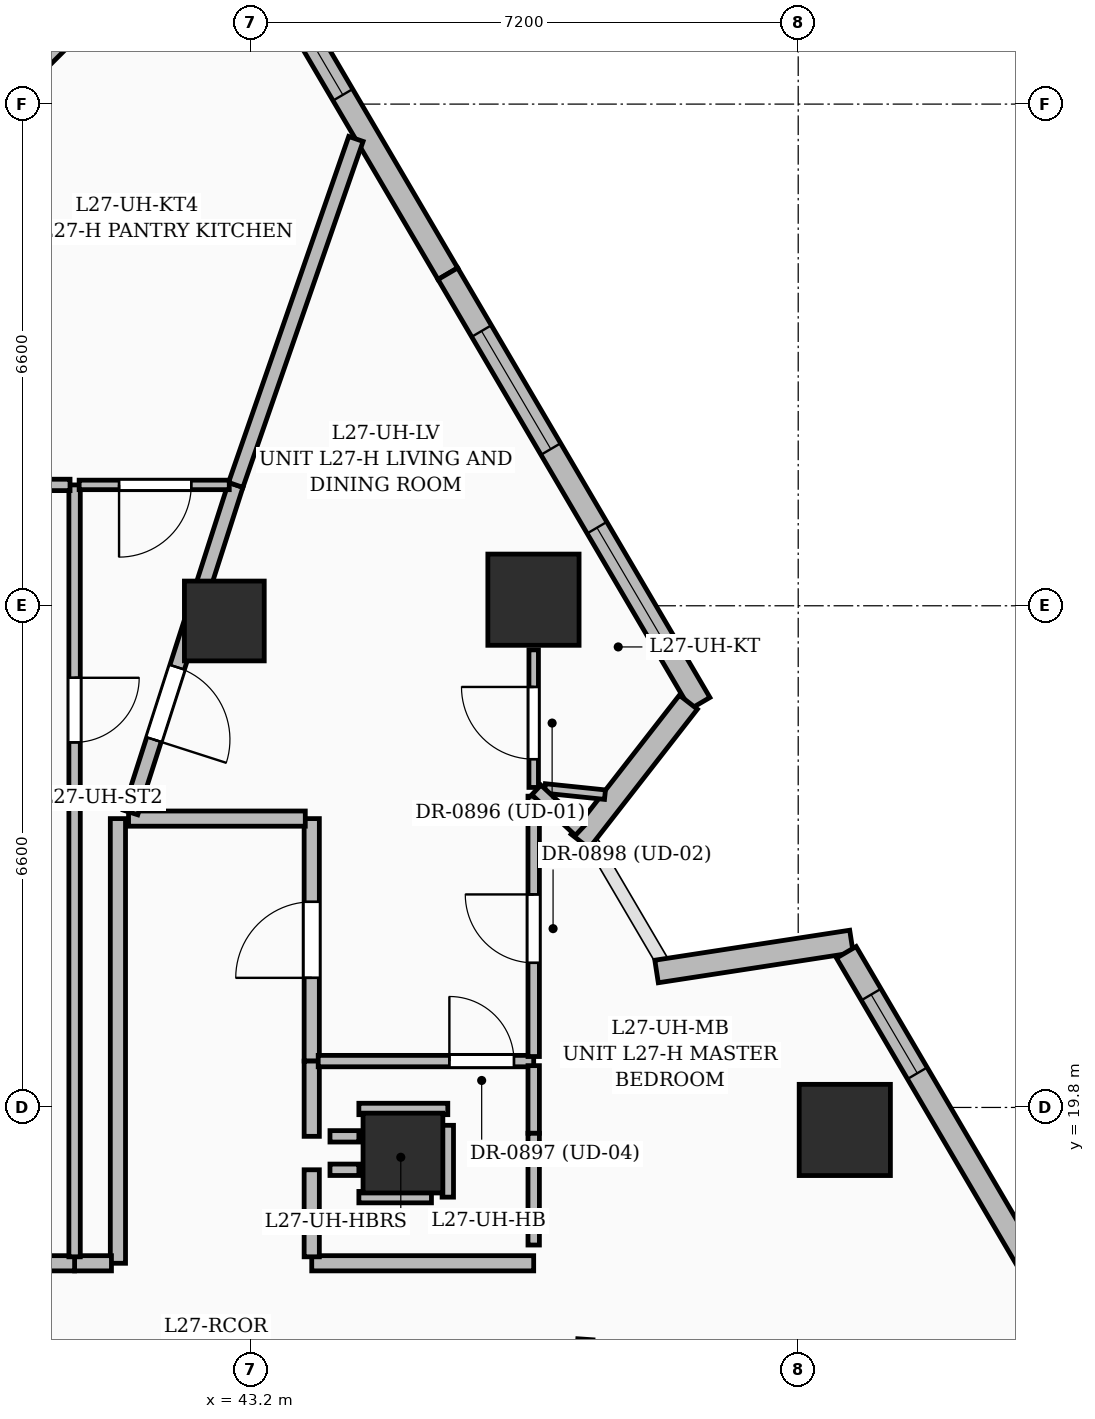
"""IFC4 building model, lengths in metres.
Left out: names, types, materials, properties, quantities, classifications, styles, units other than length and angle.
Written with IfcOpenShell. Run it as: python <this file> out.ifc"""

import sys

from ifc_helpers import new_model, si_unit, direction, frame, frame_2d, origin, origin_2d, place, context, subcontext, project, spatial, rectangle, extrude, element, fill, save


model = new_model("IFC4")
c1 = context("Model", 3, precision=1e-05, world=origin(), true_north=direction((0.0, 1.0)))
c2 = subcontext(c1, "Body", "Model", "MODEL_VIEW")
j1 = project(units=[si_unit("LENGTHUNIT", "METRE"), si_unit("PLANEANGLEUNIT", "RADIAN")], contexts=[c1])
p1 = place(None, origin())
s1 = spatial("IfcSite", under=j1, at=p1, CompositionType="ELEMENT")
p2 = place(p1, origin())
s2 = spatial("IfcBuilding", under=s1, at=p2, CompositionType="ELEMENT")
p3 = place(p2, frame((0.0, 0.0, 110.4)))
s3 = spatial("IfcBuildingStorey", under=s2, at=p3, CompositionType="ELEMENT", Elevation=110.4)
for number, where, z_axis, x_axis in (
    (1, (45.2, 19.2, 0.0), (0.0, 0.0, 1.0), (1.0, 0.0, 0.0)),
    (2, (42.85, 26.2, 0.0), (0.0, 0.0, 1.0), (1.0, 0.0, 0.0)),
):
    element("IfcColumn", number, at=place(p3, frame(where, z_axis=z_axis, x_axis=x_axis)), inside=s3, PredefinedType="COLUMN", context=c2, shape_type="SweptSolid", body=[
        extrude(rectangle(XDim=1.05, YDim=1.05, at=origin_2d()), origin(), (0.0, 0.0, 1.0), 3.6),
    ])
for number, where, z_axis, x_axis in (
    (3, (51.013, 19.504, 0.0), (0.0, 0.0, 1.0), (1.0, 0.0, 0.0)),
    (4, (46.917, 26.48, 0.0), (0.0, 0.0, 1.0), (1.0, 0.0, 0.0)),
):
    element("IfcColumn", number, at=place(p3, frame(where, z_axis=z_axis, x_axis=x_axis)), inside=s3, PredefinedType="COLUMN", context=c2, shape_type="SweptSolid", body=[
        extrude(rectangle(XDim=1.2, YDim=1.2, at=origin_2d()), origin(), (0.0, 0.0, 1.0), 3.6),
    ])
p4 = place(p3, frame((42.472, 36.42, 0.0), z_axis=(0.0, 0.0, 1.0), x_axis=(0.506315009763, -0.86234860172, 0.0)))
e5 = element("IfcWall", 5, at=p4, inside=s3, PredefinedType="SOLIDWALL", context=c2, shape_type="SweptSolid", body=[
    extrude(rectangle(XDim=6.553, YDim=0.3, at=frame_2d((3.277, 0.0))), origin(), (0.0, 0.0, 1.0), 3.35),
])
p5 = place(p4, frame((1.725, 0.0, 0.55)))
e6 = element("IfcOpeningElement", 6, at=p5, cuts=e5, PredefinedType="OPENING", context=c2, shape_type="SweptSolid", body=[
    extrude(rectangle(XDim=2.1, YDim=2.4, at=frame_2d((1.05, 1.2))), frame((0.0, 0.16, 0.0), z_axis=(0.0, -1.0, 0.0), x_axis=(1.0, 0.0, 0.0)), (0.0, 0.0, 1.0), 0.32),
])
p6 = place(p3, frame((45.791, 30.769, 0.0), z_axis=(0.0, 0.0, 1.0), x_axis=(0.506326446954, -0.862341886443, 0.0)))
e7 = element("IfcWall", 7, at=p6, inside=s3, PredefinedType="SOLIDWALL", context=c2, shape_type="SweptSolid", body=[
    extrude(rectangle(XDim=6.554, YDim=0.3, at=frame_2d((3.277, 0.0))), origin(), (0.0, 0.0, 1.0), 3.35),
])
p7 = place(p6, frame((0.875, 0.0, 0.6)))
e8 = element("IfcOpeningElement", 8, at=p7, cuts=e7, PredefinedType="OPENING", context=c2, shape_type="SweptSolid", body=[
    extrude(rectangle(XDim=1.8, YDim=2.1, at=frame_2d((0.9, 1.05))), frame((0.0, 0.16, 0.0), z_axis=(0.0, -1.0, 0.0), x_axis=(1.0, 0.0, 0.0)), (0.0, 0.0, 1.0), 0.32),
])
p8 = place(p6, frame((3.875, 0.0, 0.6)))
e9 = element("IfcOpeningElement", 9, at=p8, cuts=e7, PredefinedType="OPENING", context=c2, shape_type="SweptSolid", body=[
    extrude(rectangle(XDim=1.8, YDim=2.1, at=frame_2d((0.9, 1.05))), frame((0.0, 0.16, 0.0), z_axis=(0.0, -1.0, 0.0), x_axis=(1.0, 0.0, 0.0)), (0.0, 0.0, 1.0), 0.32),
])
p9 = place(p3, frame((48.955, 25.132, 0.0), z_axis=(0.0, 0.0, 1.0), x_axis=(-0.614326980446, -0.789051557946, 0.0)))
e10 = element("IfcWall", 10, at=p9, inside=s3, PredefinedType="SOLIDWALL", context=c2, shape_type="SweptSolid", body=[
    extrude(rectangle(XDim=2.318, YDim=0.3, at=frame_2d((1.159, 0.0))), origin(), (0.0, 0.0, 1.0), 2.575),
])
p10 = place(p3, frame((48.537, 21.589, 0.0), z_axis=(0.0, 0.0, 1.0), x_axis=(0.988351014823, 0.152191561848, 0.0)))
e11 = element("IfcWall", 11, at=p10, inside=s3, PredefinedType="SOLIDWALL", context=c2, shape_type="SweptSolid", body=[
    extrude(rectangle(XDim=2.594, YDim=0.3, at=frame_2d((1.297, 0.0))), origin(), (0.0, 0.0, 1.0), 2.575),
])
p11 = place(p3, frame((51.033, 21.841, 0.0), z_axis=(0.0, 0.0, 1.0), x_axis=(0.506317595085, -0.862347083782, 0.0)))
e12 = element("IfcWall", 12, at=p11, inside=s3, PredefinedType="SOLIDWALL", context=c2, shape_type="SweptSolid", body=[
    extrude(rectangle(XDim=6.274, YDim=0.3, at=frame_2d((3.137, 0.0))), origin(), (0.0, 0.0, 1.0), 3.35),
])
p12 = place(p11, frame((0.645, 0.0, 0.8)))
e13 = element("IfcOpeningElement", 13, at=p12, cuts=e12, PredefinedType="OPENING", context=c2, shape_type="SweptSolid", body=[
    extrude(rectangle(XDim=1.2, YDim=1.8, at=frame_2d((0.6, 0.9))), frame((0.0, 0.16, 0.0), z_axis=(0.0, -1.0, 0.0), x_axis=(1.0, 0.0, 0.0)), (0.0, 0.0, 1.0), 0.32),
])
p13 = place(p3, frame((47.425, 14.2, 0.0), z_axis=(0.0, 0.0, 1.0), x_axis=(0.068484119878, 0.997652206595, 0.0)))
e14 = element("IfcWall", 14, at=p13, inside=s3, PredefinedType="PARTITIONING", context=c2, shape_type="SweptSolid", body=[
    extrude(rectangle(XDim=2.556, YDim=0.2, at=frame_2d((1.278, 0.0))), origin(), (0.0, 0.0, 1.0), 2.372),
])
p14 = place(p3, frame((44.0, 20.41, 0.0), z_axis=(0.0, 0.0, 1.0), x_axis=(0.0, 1.0, 0.0)))
e15 = element("IfcWall", 15, at=p14, inside=s3, PredefinedType="PARTITIONING", context=c2, shape_type="SweptSolid", body=[
    extrude(rectangle(XDim=3.19, YDim=0.2, at=frame_2d((1.595, 0.0))), origin(), (0.0, 0.0, 1.0), 2.436),
])
p15 = place(p14, frame((1.095, 0.0, 0.0)))
e16 = element("IfcOpeningElement", 16, at=p15, cuts=e15, PredefinedType="OPENING", context=c2, shape_type="SweptSolid", body=[
    extrude(rectangle(XDim=1.0, YDim=2.2, at=frame_2d((0.5, 1.1))), frame((0.0, 0.11, 0.0), z_axis=(0.0, -1.0, 0.0), x_axis=(1.0, 0.0, 0.0)), (0.0, 0.0, 1.0), 0.22),
])
p16 = place(p3, frame((43.915, 23.6, 0.0), z_axis=(0.0, 0.0, 1.0), x_axis=(-1.0, 0.0, 0.0)))
e17 = element("IfcWall", 17, at=p16, inside=s3, PredefinedType="PARTITIONING", context=c2, shape_type="SweptSolid", body=[
    extrude(rectangle(XDim=2.325, YDim=0.2, at=frame_2d((1.163, 0.0))), origin(), (0.0, 0.0, 1.0), 2.436),
])
p17 = place(p3, frame((46.92, 17.75, 0.0), z_axis=(0.0, 0.0, 1.0), x_axis=(-1.0, 0.0, 0.0)))
e18 = element("IfcWall", 18, at=p17, inside=s3, PredefinedType="PARTITIONING", context=c2, shape_type="SweptSolid", body=[
    extrude(rectangle(XDim=2.92, YDim=0.2, at=frame_2d((1.46, 0.0))), origin(), (0.0, 0.0, 1.0), 2.436),
])
p18 = place(p3, frame((44.0, 17.835, 0.0), z_axis=(0.0, 0.0, 1.0), x_axis=(0.0, 1.0, 0.0)))
e19 = element("IfcWall", 19, at=p18, inside=s3, PredefinedType="PARTITIONING", context=c2, shape_type="SweptSolid", body=[
    extrude(rectangle(XDim=1.145, YDim=0.2, at=frame_2d((0.573, 0.0))), origin(), (0.0, 0.0, 1.0), 3.35),
])
p19 = place(p3, frame((44.0, 19.42, 0.0), z_axis=(0.0, 0.0, 1.0), x_axis=(0.0, 1.0, 0.0)))
e20 = element("IfcWall", 20, at=p19, inside=s3, PredefinedType="PARTITIONING", context=c2, shape_type="SweptSolid", body=[
    extrude(rectangle(XDim=0.99, YDim=0.2, at=frame_2d((0.495, 0.0))), origin(), (0.0, 0.0, 1.0), 3.35),
])
p20 = place(p3, frame((41.45, 23.6, 0.0), z_axis=(0.0, 0.0, 1.0), x_axis=(0.0, -1.0, 0.0)))
e21 = element("IfcWall", 21, at=p20, inside=s3, PredefinedType="PARTITIONING", context=c2, shape_type="SweptSolid", body=[
    extrude(rectangle(XDim=5.85, YDim=0.2, at=frame_2d((2.925, 0.0))), origin(), (0.0, 0.0, 1.0), 3.35),
])
p21 = place(p3, frame((41.365, 17.75, 0.0), z_axis=(0.0, 0.0, 1.0), x_axis=(-1.0, 0.0, 0.0)))
e22 = element("IfcWall", 22, at=p21, inside=s3, PredefinedType="PARTITIONING", context=c2, shape_type="SweptSolid", body=[
    extrude(rectangle(XDim=0.485, YDim=0.2, at=frame_2d((0.243, 0.0))), origin(), (0.0, 0.0, 1.0), 3.35),
])
p22 = place(p3, frame((40.88, 17.75, 0.0), z_axis=(0.0, 0.0, 1.0), x_axis=(-1.0, 0.0, 0.0)))
e23 = element("IfcWall", 23, at=p22, inside=s3, PredefinedType="PARTITIONING", context=c2, shape_type="SweptSolid", body=[
    extrude(rectangle(XDim=0.6, YDim=0.2, at=frame_2d((0.3, 0.0))), origin(), (0.0, 0.0, 1.0), 3.35),
])
p23 = place(p3, frame((44.085, 20.41, 0.0), z_axis=(0.0, 0.0, 1.0), x_axis=(1.0, 0.0, 0.0)))
e24 = element("IfcWall", 24, at=p23, inside=s3, PredefinedType="PARTITIONING", context=c2, shape_type="SweptSolid", body=[
    extrude(rectangle(XDim=2.835, YDim=0.15, at=frame_2d((1.417, 0.0))), origin(), (0.0, 0.0, 1.0), 2.372),
])
p24 = place(p23, frame((1.726, 0.0, 0.0)))
e25 = element("IfcOpeningElement", 25, at=p24, cuts=e24, PredefinedType="OPENING", context=c2, shape_type="SweptSolid", body=[
    extrude(rectangle(XDim=0.85, YDim=2.1, at=frame_2d((0.425, 1.05))), frame((0.0, 0.085, 0.0), z_axis=(0.0, -1.0, 0.0), x_axis=(1.0, 0.0, 0.0)), (0.0, 0.0, 1.0), 0.17),
])
p25 = place(p3, frame((46.92, 24.01, 0.0), z_axis=(0.0, 0.0, 1.0), x_axis=(0.0, 1.0, 0.0)))
e26 = element("IfcWall", 26, at=p25, inside=s3, PredefinedType="PARTITIONING", context=c2, shape_type="SweptSolid", body=[
    extrude(rectangle(XDim=1.81, YDim=0.125, at=frame_2d((0.905, 0.0))), origin(), (0.0, 0.0, 1.0), 2.372),
])
p26 = place(p25, frame((0.372, 0.0, 0.0)))
e27 = element("IfcOpeningElement", 27, at=p26, cuts=e26, PredefinedType="OPENING", context=c2, shape_type="SweptSolid", body=[
    extrude(rectangle(XDim=0.95, YDim=2.2, at=frame_2d((0.475, 1.1))), frame((0.0, 0.072, 0.0), z_axis=(0.0, -1.0, 0.0), x_axis=(1.0, 0.0, 0.0)), (0.0, 0.0, 1.0), 0.145),
])
p27 = place(p3, frame((46.92, 20.47, 0.0), z_axis=(0.0, 0.0, 1.0), x_axis=(0.0, 1.0, 0.0)))
e28 = element("IfcWall", 28, at=p27, inside=s3, PredefinedType="PARTITIONING", context=c2, shape_type="SweptSolid", body=[
    extrude(rectangle(XDim=3.425, YDim=0.15, at=frame_2d((1.712, 0.0))), origin(), (0.0, 0.0, 1.0), 2.709),
])
p28 = place(p27, frame((1.232, 0.0, 0.0)))
e29 = element("IfcOpeningElement", 29, at=p28, cuts=e28, PredefinedType="OPENING", context=c2, shape_type="SweptSolid", body=[
    extrude(rectangle(XDim=0.9, YDim=2.15, at=frame_2d((0.45, 1.075))), frame((0.0, 0.085, 0.0), z_axis=(0.0, -1.0, 0.0), x_axis=(1.0, 0.0, 0.0)), (0.0, 0.0, 1.0), 0.17),
])
p29 = place(p3, frame((43.0, 27.99, 0.0), z_axis=(0.0, 0.0, 1.0), x_axis=(-0.305803129518, -0.95209476733, 0.0)))
e30 = element("IfcWall", 30, at=p29, inside=s3, PredefinedType="PARTITIONING", context=c2, shape_type="SweptSolid", body=[
    extrude(rectangle(XDim=4.526, YDim=0.2, at=frame_2d((2.263, 0.0))), origin(), (0.0, 0.0, 1.0), 2.372),
])
p30 = place(p29, frame((2.519, 0.0, 0.0)))
e31 = element("IfcOpeningElement", 31, at=p30, cuts=e30, PredefinedType="OPENING", context=c2, shape_type="SweptSolid", body=[
    extrude(rectangle(XDim=1.0, YDim=2.2, at=frame_2d((0.5, 1.1))), frame((0.0, 0.11, 0.0), z_axis=(0.0, -1.0, 0.0), x_axis=(1.0, 0.0, 0.0)), (0.0, 0.0, 1.0), 0.22),
])
p31 = place(p3, frame((44.581, 32.542, 0.0), z_axis=(0.0, 0.0, 1.0), x_axis=(-0.328103998337, -0.944641607318, 0.0)))
e32 = element("IfcWall", 32, at=p31, inside=s3, PredefinedType="PARTITIONING", context=c2, shape_type="SweptSolid", body=[
    extrude(rectangle(XDim=4.819, YDim=0.2, at=frame_2d((2.409, 0.0))), origin(), (0.0, 0.0, 1.0), 2.57),
])
p32 = place(p3, frame((46.92, 19.46, 0.0), z_axis=(0.0, 0.0, 1.0), x_axis=(0.0, 1.0, 0.0)))
e33 = element("IfcWall", 33, at=p32, inside=s3, PredefinedType="PARTITIONING", context=c2, shape_type="SweptSolid", body=[
    extrude(rectangle(XDim=0.89, YDim=0.15, at=frame_2d((0.445, 0.0))), origin(), (0.0, 0.0, 1.0), 3.35),
])
p33 = place(p3, frame((47.067, 23.997, 0.0), z_axis=(0.0, 0.0, 1.0), x_axis=(0.99466575773, -0.103150523024, 0.0)))
e34 = element("IfcWall", 34, at=p33, inside=s3, PredefinedType="PARTITIONING", context=c2, shape_type="SweptSolid", body=[
    extrude(rectangle(XDim=0.795, YDim=0.125, at=frame_2d((0.397, 0.0))), origin(), (0.0, 0.0, 1.0), 3.35),
])
p34 = place(p3, frame((40.88, 27.99, 0.0), z_axis=(0.0, 0.0, 1.0), x_axis=(0.0, -1.0, 0.0)))
e35 = element("IfcWall", 35, at=p34, inside=s3, PredefinedType="PARTITIONING", context=c2, shape_type="SweptSolid", body=[
    extrude(rectangle(XDim=10.155, YDim=0.15, at=frame_2d((5.078, 0.0))), origin(), (0.0, 0.0, 1.0), 2.436),
])
p35 = place(p34, frame((2.537, 0.0, 0.0)))
e36 = element("IfcOpeningElement", 36, at=p35, cuts=e35, PredefinedType="OPENING", context=c2, shape_type="SweptSolid", body=[
    extrude(rectangle(XDim=0.85, YDim=2.1, at=frame_2d((0.425, 1.05))), frame((0.0, 0.085, 0.0), z_axis=(0.0, -1.0, 0.0), x_axis=(1.0, 0.0, 0.0)), (0.0, 0.0, 1.0), 0.17),
])
p36 = place(p3, frame((42.915, 27.99, 0.0), z_axis=(0.0, 0.0, 1.0), x_axis=(-1.0, 0.0, 0.0)))
e37 = element("IfcWall", 37, at=p36, inside=s3, PredefinedType="PARTITIONING", context=c2, shape_type="SweptSolid", body=[
    extrude(rectangle(XDim=1.975, YDim=0.125, at=frame_2d((0.988, 0.0))), origin(), (0.0, 0.0, 1.0), 2.372),
])
p37 = place(p36, frame((0.5, 0.0, 0.0)))
e38 = element("IfcOpeningElement", 38, at=p37, cuts=e37, PredefinedType="OPENING", context=c2, shape_type="SweptSolid", body=[
    extrude(rectangle(XDim=0.95, YDim=2.2, at=frame_2d((0.475, 1.1))), frame((0.0, 0.072, 0.0), z_axis=(0.0, -1.0, 0.0), x_axis=(1.0, 0.0, 0.0)), (0.0, 0.0, 1.0), 0.145),
])
p38 = place(p3, frame((40.82, 27.99, 0.0), z_axis=(0.0, 0.0, 1.0), x_axis=(-1.0, 0.0, 0.0)))
e39 = element("IfcWall", 39, at=p38, inside=s3, PredefinedType="PARTITIONING", context=c2, shape_type="SweptSolid", body=[
    extrude(rectangle(XDim=2.675, YDim=0.15, at=frame_2d((1.337, 0.0))), origin(), (0.0, 0.0, 1.0), 3.35),
])
p39 = place(p3, frame((41.684, 34.784, 0.0), z_axis=(0.0, 0.0, 1.0), x_axis=(-0.707106781187, -0.707106781187, 0.0)))
e40 = element("IfcWall", 40, at=p39, inside=s3, PredefinedType="PARTITIONING", context=c2, shape_type="SweptSolid", body=[
    extrude(rectangle(XDim=5.292, YDim=0.2, at=frame_2d((2.646, 0.0))), origin(), (0.0, 0.0, 1.0), 2.709),
])
p40 = place(p3, frame((47.528, 23.443, 0.0), z_axis=(0.0, 0.0, 1.0), x_axis=(-0.731583247314, 0.681752119358, 0.0)))
e41 = element("IfcWall", 41, at=p40, inside=s3, PredefinedType="PARTITIONING", context=c2, shape_type="SweptSolid", body=[
    extrude(rectangle(XDim=0.784, YDim=0.175, at=frame_2d((0.392, 0.0))), origin(), (0.0, 0.0, 1.0), 3.35),
])
p41 = place(p3, frame((44.24, 19.42, 0.0), z_axis=(0.0, 0.0, 1.0), x_axis=(1.0, 0.0, 0.0)))
e42 = element("IfcWall", 42, at=p41, inside=s3, PredefinedType="PARTITIONING", context=c2, shape_type="SweptSolid", body=[
    extrude(rectangle(XDim=0.38, YDim=0.15, at=frame_2d((0.19, 0.0))), origin(), (0.0, 0.0, 1.0), 3.35),
])
p42 = place(p3, frame((44.62, 19.78, 0.0), z_axis=(0.0, 0.0, 1.0), x_axis=(1.0, 0.0, 0.0)))
e43 = element("IfcWall", 43, at=p42, inside=s3, PredefinedType="PARTITIONING", context=c2, shape_type="SweptSolid", body=[
    extrude(rectangle(XDim=1.17, YDim=0.15, at=frame_2d((0.585, 0.0))), origin(), (0.0, 0.0, 1.0), 2.372),
])
p43 = place(p3, frame((45.79, 19.565, 0.0), z_axis=(0.0, 0.0, 1.0), x_axis=(0.0, -1.0, 0.0)))
e44 = element("IfcWall", 44, at=p43, inside=s3, PredefinedType="PARTITIONING", context=c2, shape_type="SweptSolid", body=[
    extrude(rectangle(XDim=0.945, YDim=0.15, at=frame_2d((0.472, 0.0))), origin(), (0.0, 0.0, 1.0), 3.35),
])
p44 = place(p3, frame((45.575, 18.62, 0.0), z_axis=(0.0, 0.0, 1.0), x_axis=(-1.0, 0.0, 0.0)))
e45 = element("IfcWall", 45, at=p44, inside=s3, PredefinedType="PARTITIONING", context=c2, shape_type="SweptSolid", body=[
    extrude(rectangle(XDim=0.955, YDim=0.15, at=frame_2d((0.478, 0.0))), origin(), (0.0, 0.0, 1.0), 2.436),
])
p45 = place(p3, frame((44.62, 18.98, 0.0), z_axis=(0.0, 0.0, 1.0), x_axis=(-1.0, 0.0, 0.0)))
e46 = element("IfcWall", 46, at=p45, inside=s3, PredefinedType="PARTITIONING", context=c2, shape_type="SweptSolid", body=[
    extrude(rectangle(XDim=0.38, YDim=0.15, at=frame_2d((0.19, 0.0))), origin(), (0.0, 0.0, 1.0), 3.35),
])
p46 = place(p3, frame((46.92, 17.99, 0.0), z_axis=(0.0, 0.0, 1.0), x_axis=(0.0, 1.0, 0.0)))
e47 = element("IfcWall", 47, at=p46, inside=s3, PredefinedType="PARTITIONING", context=c2, shape_type="SweptSolid", body=[
    extrude(rectangle(XDim=1.47, YDim=0.15, at=frame_2d((0.735, 0.0))), origin(), (0.0, 0.0, 1.0), 3.35),
])
p47 = place(p5, origin())
e48 = element("IfcWindow", 48, at=p47, inside=s3, PartitioningType="SINGLE_PANEL", PredefinedType="WINDOW", context=c2, shape_type="SweptSolid", body=[
    extrude(rectangle(XDim=2.1, YDim=2.4, at=frame_2d((1.05, 1.2))), frame((0.0, 0.03, 0.0), z_axis=(0.0, -1.0, 0.0), x_axis=(1.0, 0.0, 0.0)), (0.0, 0.0, 1.0), 0.06),
])
fill(e6, e48)
p48 = place(p7, origin())
e49 = element("IfcWindow", 49, at=p48, inside=s3, PartitioningType="SINGLE_PANEL", PredefinedType="WINDOW", context=c2, shape_type="SweptSolid", body=[
    extrude(rectangle(XDim=1.8, YDim=2.1, at=frame_2d((0.9, 1.05))), frame((0.0, 0.03, 0.0), z_axis=(0.0, -1.0, 0.0), x_axis=(1.0, 0.0, 0.0)), (0.0, 0.0, 1.0), 0.06),
])
fill(e8, e49)
p49 = place(p8, origin())
e50 = element("IfcWindow", 50, at=p49, inside=s3, PartitioningType="SINGLE_PANEL", PredefinedType="WINDOW", context=c2, shape_type="SweptSolid", body=[
    extrude(rectangle(XDim=1.8, YDim=2.1, at=frame_2d((0.9, 1.05))), frame((0.0, 0.03, 0.0), z_axis=(0.0, -1.0, 0.0), x_axis=(1.0, 0.0, 0.0)), (0.0, 0.0, 1.0), 0.06),
])
fill(e9, e50)
p50 = place(p12, origin())
e51 = element("IfcWindow", 51, at=p50, inside=s3, PartitioningType="SINGLE_PANEL", PredefinedType="WINDOW", context=c2, shape_type="SweptSolid", body=[
    extrude(rectangle(XDim=1.2, YDim=1.8, at=frame_2d((0.6, 0.9))), frame((0.0, 0.03, 0.0), z_axis=(0.0, -1.0, 0.0), x_axis=(1.0, 0.0, 0.0)), (0.0, 0.0, 1.0), 0.06),
])
fill(e13, e51)
p51 = place(p15, origin())
e52 = element("IfcDoor", 52, at=p51, inside=s3, OperationType="SINGLE_SWING_LEFT", PredefinedType="DOOR", context=c2, shape_type="SweptSolid", body=[
    extrude(rectangle(XDim=1.0, YDim=2.2, at=frame_2d((0.5, 1.1))), frame((0.0, 0.025, 0.0), z_axis=(0.0, -1.0, 0.0), x_axis=(1.0, 0.0, 0.0)), (0.0, 0.0, 1.0), 0.05),
])
fill(e16, e52)
p52 = place(p26, origin())
e53 = element("IfcDoor", 53, at=p52, inside=s3, OperationType="SINGLE_SWING_RIGHT", PredefinedType="DOOR", context=c2, shape_type="SweptSolid", body=[
    extrude(rectangle(XDim=0.95, YDim=2.2, at=frame_2d((0.475, 1.1))), frame((0.0, 0.025, 0.0), z_axis=(0.0, -1.0, 0.0), x_axis=(1.0, 0.0, 0.0)), (0.0, 0.0, 1.0), 0.05),
])
fill(e27, e53)
p53 = place(p24, origin())
e54 = element("IfcDoor", 54, at=p53, inside=s3, OperationType="SINGLE_SWING_LEFT", PredefinedType="DOOR", context=c2, shape_type="SweptSolid", body=[
    extrude(rectangle(XDim=0.85, YDim=2.1, at=frame_2d((0.425, 1.05))), frame((0.0, 0.025, 0.0), z_axis=(0.0, -1.0, 0.0), x_axis=(1.0, 0.0, 0.0)), (0.0, 0.0, 1.0), 0.05),
])
fill(e25, e54)
p54 = place(p28, origin())
e55 = element("IfcDoor", 55, at=p54, inside=s3, OperationType="SINGLE_SWING_RIGHT", PredefinedType="DOOR", context=c2, shape_type="SweptSolid", body=[
    extrude(rectangle(XDim=0.9, YDim=2.15, at=frame_2d((0.45, 1.075))), frame((0.0, 0.025, 0.0), z_axis=(0.0, -1.0, 0.0), x_axis=(1.0, 0.0, 0.0)), (0.0, 0.0, 1.0), 0.05),
])
fill(e29, e55)
p55 = place(p37, origin())
e56 = element("IfcDoor", 56, at=p55, inside=s3, OperationType="SINGLE_SWING_RIGHT", PredefinedType="DOOR", context=c2, shape_type="SweptSolid", body=[
    extrude(rectangle(XDim=0.95, YDim=2.2, at=frame_2d((0.475, 1.1))), frame((0.0, 0.025, 0.0), z_axis=(0.0, -1.0, 0.0), x_axis=(1.0, 0.0, 0.0)), (0.0, 0.0, 1.0), 0.05),
])
fill(e38, e56)
p56 = place(p35, origin())
e57 = element("IfcDoor", 57, at=p56, inside=s3, OperationType="SINGLE_SWING_LEFT", PredefinedType="DOOR", context=c2, shape_type="SweptSolid", body=[
    extrude(rectangle(XDim=0.85, YDim=2.1, at=frame_2d((0.425, 1.05))), frame((0.0, 0.025, 0.0), z_axis=(0.0, -1.0, 0.0), x_axis=(1.0, 0.0, 0.0)), (0.0, 0.0, 1.0), 0.05),
])
fill(e36, e57)
p57 = place(p30, origin())
e58 = element("IfcDoor", 58, at=p57, inside=s3, OperationType="SINGLE_SWING_RIGHT", PredefinedType="DOOR", context=c2, shape_type="SweptSolid", body=[
    extrude(rectangle(XDim=1.0, YDim=2.2, at=frame_2d((0.5, 1.1))), frame((0.0, 0.025, 0.0), z_axis=(0.0, -1.0, 0.0), x_axis=(1.0, 0.0, 0.0)), (0.0, 0.0, 1.0), 0.05),
])
fill(e31, e58)
save(model, sys.argv[1])
